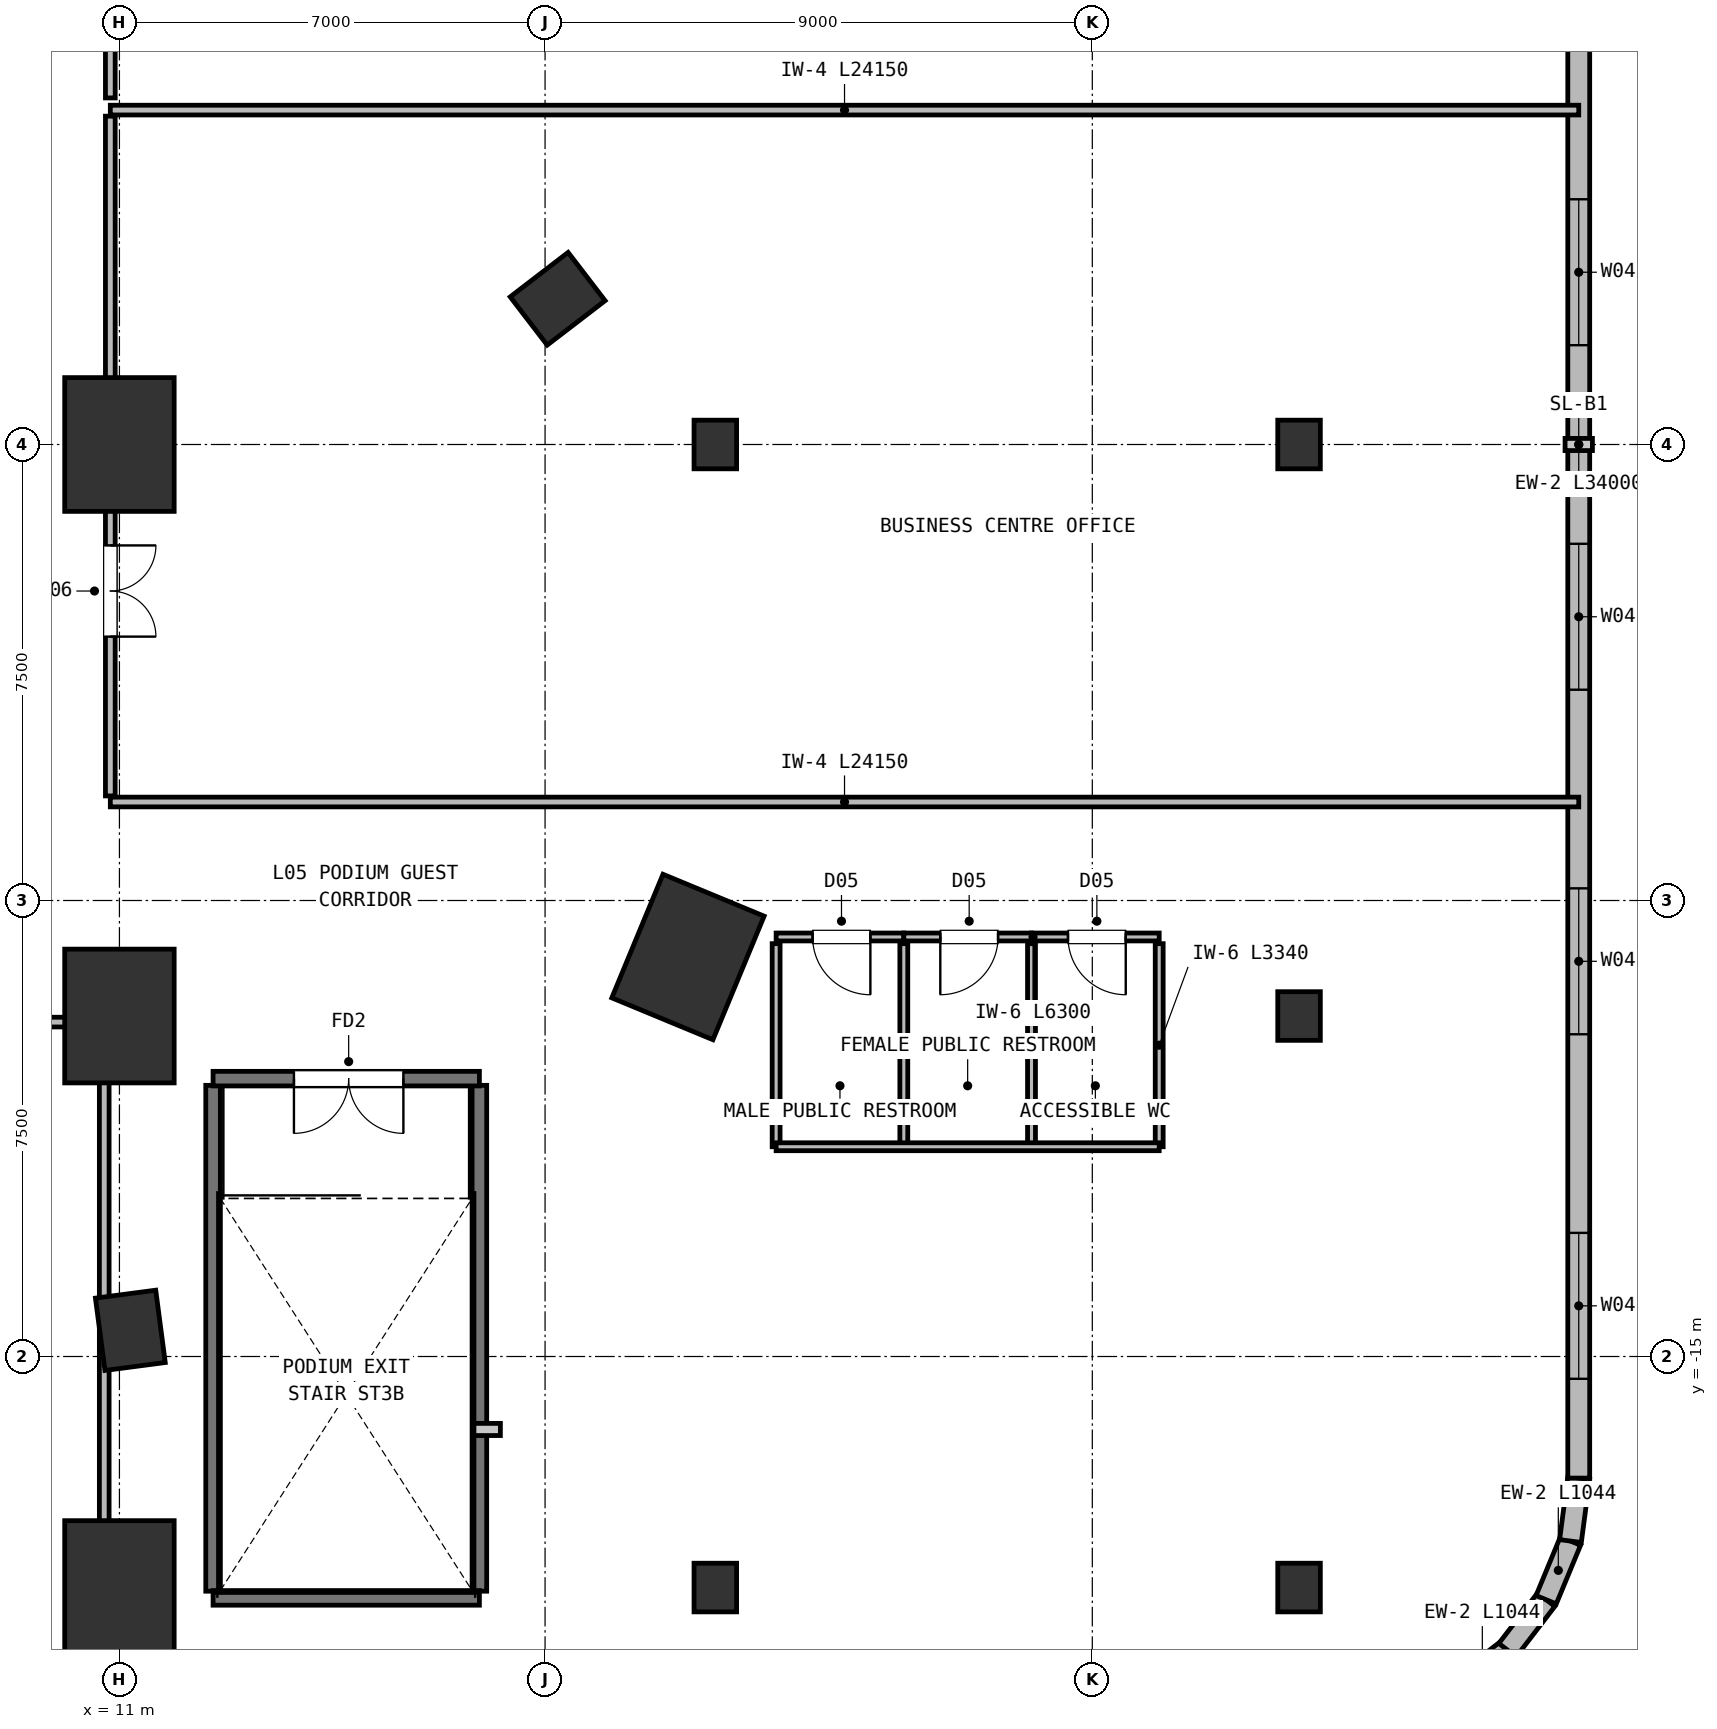
"""IFC4 building model, lengths in metres.
Left out: names, types, materials, properties, quantities, classifications, styles, units other than length and angle.
Written with IfcOpenShell. Run it as: python <this file> out.ifc"""

import sys

from ifc_helpers import new_model, si_unit, direction, frame, frame_2d, origin, origin_2d, place, context, subcontext, project, spatial, rectangle, extrude, element, fill, save


model = new_model("IFC4")
c1 = context("Model", 3, precision=1e-05, world=origin(), true_north=direction((0.0, 1.0)))
c2 = subcontext(c1, "Body", "Model", "MODEL_VIEW")
j1 = project(units=[si_unit("LENGTHUNIT", "METRE"), si_unit("PLANEANGLEUNIT", "RADIAN")], contexts=[c1])
p1 = place(None, origin())
s1 = spatial("IfcSite", under=j1, at=p1, CompositionType="ELEMENT")
p2 = place(p1, origin())
s2 = spatial("IfcBuilding", under=s1, at=p2, CompositionType="ELEMENT")
p3 = place(p2, frame((0.0, 0.0, 26.0)))
s3 = spatial("IfcBuildingStorey", under=s2, at=p3, CompositionType="ELEMENT", Elevation=26.0)
p4 = place(p3, frame((11.179, -14.569, 0.0), z_axis=(0.0, 0.0, 1.0), x_axis=(0.991444861374, 0.13052619222, 0.0)))
e1 = element("IfcColumn", 1, at=p4, inside=s3, PredefinedType="COLUMN", context=c2, shape_type="SweptSolid", body=[
    extrude(rectangle(XDim=1.0, YDim=1.2, at=origin_2d()), origin(), (0.0, 0.0, 1.0), 4.5),
])
p5 = place(p3, frame((20.35, -8.429, 0.0), z_axis=(0.0, 0.0, 1.0), x_axis=(-0.923879532511, 0.382683432365, 0.0)))
e2 = element("IfcColumn", 2, at=p5, inside=s3, PredefinedType="COLUMN", context=c2, shape_type="SweptSolid", body=[
    extrude(rectangle(XDim=1.8, YDim=2.2, at=origin_2d()), origin(), (0.0, 0.0, 1.0), 4.5),
])
p6 = place(p3, frame((18.207, 2.397, 0.0), z_axis=(0.0, 0.0, 1.0), x_axis=(-0.608761429009, 0.793353340291, 0.0)))
e3 = element("IfcColumn", 3, at=p6, inside=s3, PredefinedType="COLUMN", context=c2, shape_type="SweptSolid", body=[
    extrude(rectangle(XDim=1.0, YDim=1.2, at=origin_2d()), origin(), (0.0, 0.0, 1.0), 4.5),
])
for number, where, z_axis, x_axis in (
    (4, (11.0, -18.8, 0.0), (0.0, 0.0, 1.0), (1.0, 0.0, 0.0)),
    (5, (11.0, -9.4, 0.0), (0.0, 0.0, 1.0), (1.0, 0.0, 0.0)),
    (6, (11.0, 0.0, 0.0), (0.0, 0.0, 1.0), (1.0, 0.0, 0.0)),
):
    element("IfcColumn", number, at=place(p3, frame(where, z_axis=z_axis, x_axis=x_axis)), inside=s3, PredefinedType="COLUMN", context=c2, shape_type="SweptSolid", body=[
        extrude(rectangle(XDim=1.8, YDim=2.2, at=origin_2d()), origin(), (0.0, 0.0, 1.0), 4.5),
    ])
for number, where, z_axis, x_axis in (
    (7, (20.8, -18.8, 0.0), (0.0, 0.0, 1.0), (1.0, 0.0, 0.0)),
    (8, (20.8, 0.0, 0.0), (0.0, 0.0, 1.0), (1.0, 0.0, 0.0)),
    (9, (30.4, -18.8, 0.0), (0.0, 0.0, 1.0), (1.0, 0.0, 0.0)),
    (10, (30.4, -9.4, 0.0), (0.0, 0.0, 1.0), (1.0, 0.0, 0.0)),
    (11, (30.4, 0.0, 0.0), (0.0, 0.0, 1.0), (1.0, 0.0, 0.0)),
):
    element("IfcColumn", number, at=place(p3, frame(where, z_axis=z_axis, x_axis=x_axis)), inside=s3, PredefinedType="COLUMN", context=c2, shape_type="SweptSolid", body=[
        extrude(rectangle(XDim=0.7, YDim=0.8, at=origin_2d()), origin(), (0.0, 0.0, 1.0), 4.5),
    ])
for number, where, z_axis, x_axis in (
    (12, (33.828, -19.828, 0.0), (0.0, 0.0, 1.0), (-0.793, -0.609, 0.0)),
    (13, (34.464, -19.0, 0.0), (0.0, 0.0, 1.0), (-0.609, -0.793, 0.0)),
    (14, (34.864, -18.035, 0.0), (0.0, 0.0, 1.0), (-0.383, -0.924, 0.0)),
):
    element("IfcWall", number, at=place(p3, frame(where, z_axis=z_axis, x_axis=x_axis)), inside=s3, PredefinedType="SOLIDWALL", context=c2, shape_type="SweptSolid", body=[
        extrude(rectangle(XDim=1.044, YDim=0.36, at=frame_2d((0.522, 0.0))), origin(), (0.0, 0.0, 1.0), 4.25),
    ])
p7 = place(p3, frame((35.0, -17.0, 0.0), z_axis=(0.0, 0.0, 1.0), x_axis=(-0.130448465198, -0.991455091231, 0.0)))
e15 = element("IfcWall", 15, at=p7, inside=s3, PredefinedType="SOLIDWALL", context=c2, shape_type="SweptSolid", body=[
    extrude(rectangle(XDim=1.044, YDim=0.36, at=frame_2d((0.522, 0.0))), origin(), (0.0, 0.0, 1.0), 4.25),
])
p8 = place(p3, frame((35.0, 17.0, 0.0), z_axis=(0.0, 0.0, 1.0), x_axis=(0.0, -1.0, 0.0)))
e16 = element("IfcWall", 16, at=p8, inside=s3, PredefinedType="SOLIDWALL", context=c2, shape_type="SweptSolid", body=[
    extrude(rectangle(XDim=34.0, YDim=0.36, at=frame_2d((17.0, 0.0))), origin(), (0.0, 0.0, 1.0), 4.25),
])
p9 = place(p8, frame((1.633, 0.0, 0.95)))
e17 = element("IfcOpeningElement", 17, at=p9, cuts=e16, PredefinedType="OPENING", context=c2, shape_type="SweptSolid", body=[
    extrude(rectangle(XDim=2.4, YDim=2.6, at=frame_2d((1.2, 1.3))), frame((0.0, 0.19, 0.0), z_axis=(0.0, -1.0, 0.0), x_axis=(1.0, 0.0, 0.0)), (0.0, 0.0, 1.0), 0.38),
])
p10 = place(p8, frame((7.3, 0.0, 0.95)))
e18 = element("IfcOpeningElement", 18, at=p10, cuts=e16, PredefinedType="OPENING", context=c2, shape_type="SweptSolid", body=[
    extrude(rectangle(XDim=2.4, YDim=2.6, at=frame_2d((1.2, 1.3))), frame((0.0, 0.19, 0.0), z_axis=(0.0, -1.0, 0.0), x_axis=(1.0, 0.0, 0.0)), (0.0, 0.0, 1.0), 0.38),
])
p11 = place(p8, frame((12.967, 0.0, 0.95)))
e19 = element("IfcOpeningElement", 19, at=p11, cuts=e16, PredefinedType="OPENING", context=c2, shape_type="SweptSolid", body=[
    extrude(rectangle(XDim=2.4, YDim=2.6, at=frame_2d((1.2, 1.3))), frame((0.0, 0.19, 0.0), z_axis=(0.0, -1.0, 0.0), x_axis=(1.0, 0.0, 0.0)), (0.0, 0.0, 1.0), 0.38),
])
p12 = place(p8, frame((18.633, 0.0, 0.95)))
e20 = element("IfcOpeningElement", 20, at=p12, cuts=e16, PredefinedType="OPENING", context=c2, shape_type="SweptSolid", body=[
    extrude(rectangle(XDim=2.4, YDim=2.6, at=frame_2d((1.2, 1.3))), frame((0.0, 0.19, 0.0), z_axis=(0.0, -1.0, 0.0), x_axis=(1.0, 0.0, 0.0)), (0.0, 0.0, 1.0), 0.38),
])
p13 = place(p8, frame((24.3, 0.0, 0.95)))
e21 = element("IfcOpeningElement", 21, at=p13, cuts=e16, PredefinedType="OPENING", context=c2, shape_type="SweptSolid", body=[
    extrude(rectangle(XDim=2.4, YDim=2.6, at=frame_2d((1.2, 1.3))), frame((0.0, 0.19, 0.0), z_axis=(0.0, -1.0, 0.0), x_axis=(1.0, 0.0, 0.0)), (0.0, 0.0, 1.0), 0.38),
])
p14 = place(p8, frame((29.967, 0.0, 0.95)))
e22 = element("IfcOpeningElement", 22, at=p14, cuts=e16, PredefinedType="OPENING", context=c2, shape_type="SweptSolid", body=[
    extrude(rectangle(XDim=2.4, YDim=2.6, at=frame_2d((1.2, 1.3))), frame((0.0, 0.19, 0.0), z_axis=(0.0, -1.0, 0.0), x_axis=(1.0, 0.0, 0.0)), (0.0, 0.0, 1.0), 0.38),
])
for number, where, z_axis, x_axis in (
    (23, (12.54, -18.86, 0.0), (0.0, 0.0, 1.0), (0.0, 1.0, 0.0)),
    (24, (16.92, -18.86, 0.0), (0.0, 0.0, 1.0), (0.0, 1.0, 0.0)),
):
    element("IfcWall", number, at=place(p3, frame(where, z_axis=z_axis, x_axis=x_axis)), inside=s3, PredefinedType="SHEAR", context=c2, shape_type="SweptSolid", body=[
        extrude(rectangle(XDim=8.32, YDim=0.24, at=frame_2d((4.16, 0.0))), origin(), (0.0, 0.0, 1.0), 4.25),
    ])
p15 = place(p3, frame((12.54, -18.97, 0.0), z_axis=(0.0, 0.0, 1.0), x_axis=(1.0, 0.0, 0.0)))
e25 = element("IfcWall", 25, at=p15, inside=s3, PredefinedType="SHEAR", context=c2, shape_type="SweptSolid", body=[
    extrude(rectangle(XDim=4.38, YDim=0.24, at=frame_2d((2.19, 0.0))), origin(), (0.0, 0.0, 1.0), 4.25),
])
p16 = place(p3, frame((16.92, -10.43, 0.0), z_axis=(0.0, 0.0, 1.0), x_axis=(-1.0, 0.0, 0.0)))
e26 = element("IfcWall", 26, at=p16, inside=s3, PredefinedType="SHEAR", context=c2, shape_type="SweptSolid", body=[
    extrude(rectangle(XDim=4.38, YDim=0.24, at=frame_2d((2.19, 0.0))), origin(), (0.0, 0.0, 1.0), 4.25),
])
p17 = place(p16, frame((1.25, 0.0, 0.0)))
e27 = element("IfcOpeningElement", 27, at=p17, cuts=e26, PredefinedType="OPENING", context=c2, shape_type="SweptSolid", body=[
    extrude(rectangle(XDim=1.8, YDim=2.2, at=frame_2d((0.9, 1.1))), frame((0.0, 0.13, 0.0), z_axis=(0.0, -1.0, 0.0), x_axis=(1.0, 0.0, 0.0)), (0.0, 0.0, 1.0), 0.26),
])
p18 = place(p3, frame((23.9, -8.1, 0.0), z_axis=(0.0, 0.0, 1.0), x_axis=(-1.0, 0.0, 0.0)))
e28 = element("IfcWall", 28, at=p18, inside=s3, PredefinedType="PARTITIONING", context=c2, shape_type="SweptSolid", body=[
    extrude(rectangle(XDim=2.1, YDim=0.13, at=frame_2d((1.05, 0.0))), origin(), (0.0, 0.0, 1.0), 4.25),
])
p19 = place(p18, frame((0.55, 0.0, 0.0)))
e29 = element("IfcOpeningElement", 29, at=p19, cuts=e28, PredefinedType="OPENING", context=c2, shape_type="SweptSolid", body=[
    extrude(rectangle(XDim=0.95, YDim=2.1, at=frame_2d((0.475, 1.05))), frame((0.0, 0.075, 0.0), z_axis=(0.0, -1.0, 0.0), x_axis=(1.0, 0.0, 0.0)), (0.0, 0.0, 1.0), 0.15),
])
p20 = place(p3, frame((21.8, -11.55, 0.0), z_axis=(0.0, 0.0, 1.0), x_axis=(0.0, 1.0, 0.0)))
e30 = element("IfcWall", 30, at=p20, inside=s3, PredefinedType="PARTITIONING", context=c2, shape_type="SweptSolid", body=[
    extrude(rectangle(XDim=3.34, YDim=0.13, at=frame_2d((1.67, 0.0))), origin(), (0.0, 0.0, 1.0), 4.25),
])
p21 = place(p3, frame((26.0, -8.1, 0.0), z_axis=(0.0, 0.0, 1.0), x_axis=(-1.0, 0.0, 0.0)))
e31 = element("IfcWall", 31, at=p21, inside=s3, PredefinedType="PARTITIONING", context=c2, shape_type="SweptSolid", body=[
    extrude(rectangle(XDim=2.1, YDim=0.13, at=frame_2d((1.05, 0.0))), origin(), (0.0, 0.0, 1.0), 4.25),
])
p22 = place(p21, frame((0.55, 0.0, 0.0)))
e32 = element("IfcOpeningElement", 32, at=p22, cuts=e31, PredefinedType="OPENING", context=c2, shape_type="SweptSolid", body=[
    extrude(rectangle(XDim=0.95, YDim=2.1, at=frame_2d((0.475, 1.05))), frame((0.0, 0.075, 0.0), z_axis=(0.0, -1.0, 0.0), x_axis=(1.0, 0.0, 0.0)), (0.0, 0.0, 1.0), 0.15),
])
p23 = place(p3, frame((23.9, -11.55, 0.0), z_axis=(0.0, 0.0, 1.0), x_axis=(0.0, 1.0, 0.0)))
e33 = element("IfcWall", 33, at=p23, inside=s3, PredefinedType="PARTITIONING", context=c2, shape_type="SweptSolid", body=[
    extrude(rectangle(XDim=3.34, YDim=0.13, at=frame_2d((1.67, 0.0))), origin(), (0.0, 0.0, 1.0), 4.25),
])
p24 = place(p3, frame((28.1, -8.1, 0.0), z_axis=(0.0, 0.0, 1.0), x_axis=(-1.0, 0.0, 0.0)))
e34 = element("IfcWall", 34, at=p24, inside=s3, PredefinedType="PARTITIONING", context=c2, shape_type="SweptSolid", body=[
    extrude(rectangle(XDim=2.1, YDim=0.13, at=frame_2d((1.05, 0.0))), origin(), (0.0, 0.0, 1.0), 4.25),
])
p25 = place(p24, frame((0.55, 0.0, 0.0)))
e35 = element("IfcOpeningElement", 35, at=p25, cuts=e34, PredefinedType="OPENING", context=c2, shape_type="SweptSolid", body=[
    extrude(rectangle(XDim=0.95, YDim=2.1, at=frame_2d((0.475, 1.05))), frame((0.0, 0.075, 0.0), z_axis=(0.0, -1.0, 0.0), x_axis=(1.0, 0.0, 0.0)), (0.0, 0.0, 1.0), 0.15),
])
for number, where, z_axis, x_axis in (
    (36, (26.0, -11.55, 0.0), (0.0, 0.0, 1.0), (0.0, 1.0, 0.0)),
    (37, (28.1, -11.55, 0.0), (0.0, 0.0, 1.0), (0.0, 1.0, 0.0)),
):
    element("IfcWall", number, at=place(p3, frame(where, z_axis=z_axis, x_axis=x_axis)), inside=s3, PredefinedType="PARTITIONING", context=c2, shape_type="SweptSolid", body=[
        extrude(rectangle(XDim=3.34, YDim=0.13, at=frame_2d((1.67, 0.0))), origin(), (0.0, 0.0, 1.0), 4.25),
    ])
p26 = place(p3, frame((21.8, -11.55, 0.0), z_axis=(0.0, 0.0, 1.0), x_axis=(1.0, 0.0, 0.0)))
e38 = element("IfcWall", 38, at=p26, inside=s3, PredefinedType="PARTITIONING", context=c2, shape_type="SweptSolid", body=[
    extrude(rectangle(XDim=6.3, YDim=0.13, at=frame_2d((3.15, 0.0))), origin(), (0.0, 0.0, 1.0), 4.25),
])
p27 = place(p3, frame((35.0, 5.5, 0.0), z_axis=(0.0, 0.0, 1.0), x_axis=(-1.0, 0.0, 0.0)))
e39 = element("IfcWall", 39, at=p27, inside=s3, PredefinedType="PARTITIONING", context=c2, shape_type="SweptSolid", body=[
    extrude(rectangle(XDim=24.15, YDim=0.16, at=frame_2d((12.075, 0.0))), origin(), (0.0, 0.0, 1.0), 3.32),
])
p28 = place(p3, frame((10.85, -5.88, 0.0), z_axis=(0.0, 0.0, 1.0), x_axis=(1.0, 0.0, 0.0)))
e40 = element("IfcWall", 40, at=p28, inside=s3, PredefinedType="PARTITIONING", context=c2, shape_type="SweptSolid", body=[
    extrude(rectangle(XDim=24.15, YDim=0.16, at=frame_2d((12.075, 0.0))), origin(), (0.0, 0.0, 1.0), 4.25),
])
p29 = place(p3, frame((10.85, 5.4, 0.0), z_axis=(0.0, 0.0, 1.0), x_axis=(0.0, -1.0, 0.0)))
e41 = element("IfcWall", 41, at=p29, inside=s3, PredefinedType="PARTITIONING", context=c2, shape_type="SweptSolid", body=[
    extrude(rectangle(XDim=11.18, YDim=0.16, at=frame_2d((5.59, 0.0))), origin(), (0.0, 0.0, 1.0), 3.63),
])
p30 = place(p29, frame((7.06, 0.0, 0.0)))
e42 = element("IfcOpeningElement", 42, at=p30, cuts=e41, PredefinedType="OPENING", context=c2, shape_type="SweptSolid", body=[
    extrude(rectangle(XDim=1.5, YDim=2.2, at=frame_2d((0.75, 1.1))), frame((0.0, 0.09, 0.0), z_axis=(0.0, -1.0, 0.0), x_axis=(1.0, 0.0, 0.0)), (0.0, 0.0, 1.0), 0.18),
])
p31 = place(p3, frame((10.85, 20.9, 0.0), z_axis=(0.0, 0.0, 1.0), x_axis=(0.0, -1.0, 0.0)))
e43 = element("IfcWall", 43, at=p31, inside=s3, PredefinedType="PARTITIONING", context=c2, shape_type="SweptSolid", body=[
    extrude(rectangle(XDim=15.2, YDim=0.16, at=frame_2d((7.6, 0.0))), origin(), (0.0, 0.0, 1.0), 3.62),
])
p32 = place(p31, frame((5.65, 0.0, 0.0)))
e44 = element("IfcOpeningElement", 44, at=p32, cuts=e43, PredefinedType="OPENING", context=c2, shape_type="SweptSolid", body=[
    extrude(rectangle(XDim=1.5, YDim=2.2, at=frame_2d((0.75, 1.1))), frame((0.0, 0.09, 0.0), z_axis=(0.0, -1.0, 0.0), x_axis=(1.0, 0.0, 0.0)), (0.0, 0.0, 1.0), 0.18),
])
p33 = place(p3, frame((10.75, -9.5, 0.0), z_axis=(0.0, 0.0, 1.0), x_axis=(-1.0, 0.0, 0.0)))
e45 = element("IfcWall", 45, at=p33, inside=s3, PredefinedType="PARTITIONING", context=c2, shape_type="SweptSolid", body=[
    extrude(rectangle(XDim=21.5, YDim=0.16, at=frame_2d((10.75, 0.0))), origin(), (0.0, 0.0, 1.0), 3.33),
])
p34 = place(p33, frame((13.8, 0.0, 0.0)))
e46 = element("IfcOpeningElement", 46, at=p34, cuts=e45, PredefinedType="OPENING", context=c2, shape_type="SweptSolid", body=[
    extrude(rectangle(XDim=1.5, YDim=2.2, at=frame_2d((0.75, 1.1))), frame((0.0, 0.09, 0.0), z_axis=(0.0, -1.0, 0.0), x_axis=(1.0, 0.0, 0.0)), (0.0, 0.0, 1.0), 0.18),
])
p35 = place(p3, frame((10.75, -20.9, 0.0), z_axis=(0.0, 0.0, 1.0), x_axis=(0.0, 1.0, 0.0)))
e47 = element("IfcWall", 47, at=p35, inside=s3, PredefinedType="PARTITIONING", context=c2, shape_type="SweptSolid", body=[
    extrude(rectangle(XDim=11.3, YDim=0.16, at=frame_2d((5.65, 0.0))), origin(), (0.0, 0.0, 1.0), 4.25),
])
p36 = place(p11, origin())
e48 = element("IfcWindow", 48, at=p36, inside=s3, PartitioningType="SINGLE_PANEL", PredefinedType="WINDOW", context=c2, shape_type="SweptSolid", body=[
    extrude(rectangle(XDim=2.4, YDim=2.6, at=frame_2d((1.2, 1.3))), frame((0.0, 0.03, 0.0), z_axis=(0.0, -1.0, 0.0), x_axis=(1.0, 0.0, 0.0)), (0.0, 0.0, 1.0), 0.06),
])
fill(e19, e48)
p37 = place(p12, origin())
e49 = element("IfcWindow", 49, at=p37, inside=s3, PartitioningType="SINGLE_PANEL", PredefinedType="WINDOW", context=c2, shape_type="SweptSolid", body=[
    extrude(rectangle(XDim=2.4, YDim=2.6, at=frame_2d((1.2, 1.3))), frame((0.0, 0.03, 0.0), z_axis=(0.0, -1.0, 0.0), x_axis=(1.0, 0.0, 0.0)), (0.0, 0.0, 1.0), 0.06),
])
fill(e20, e49)
p38 = place(p13, origin())
e50 = element("IfcWindow", 50, at=p38, inside=s3, PartitioningType="SINGLE_PANEL", PredefinedType="WINDOW", context=c2, shape_type="SweptSolid", body=[
    extrude(rectangle(XDim=2.4, YDim=2.6, at=frame_2d((1.2, 1.3))), frame((0.0, 0.03, 0.0), z_axis=(0.0, -1.0, 0.0), x_axis=(1.0, 0.0, 0.0)), (0.0, 0.0, 1.0), 0.06),
])
fill(e21, e50)
p39 = place(p14, origin())
e51 = element("IfcWindow", 51, at=p39, inside=s3, PartitioningType="SINGLE_PANEL", PredefinedType="WINDOW", context=c2, shape_type="SweptSolid", body=[
    extrude(rectangle(XDim=2.4, YDim=2.6, at=frame_2d((1.2, 1.3))), frame((0.0, 0.03, 0.0), z_axis=(0.0, -1.0, 0.0), x_axis=(1.0, 0.0, 0.0)), (0.0, 0.0, 1.0), 0.06),
])
fill(e22, e51)
p40 = place(p17, origin())
e52 = element("IfcDoor", 52, at=p40, inside=s3, OperationType="DOUBLE_DOOR_SINGLE_SWING", PredefinedType="DOOR", context=c2, shape_type="SweptSolid", body=[
    extrude(rectangle(XDim=1.8, YDim=2.2, at=frame_2d((0.9, 1.1))), frame((0.0, 0.025, 0.0), z_axis=(0.0, -1.0, 0.0), x_axis=(1.0, 0.0, 0.0)), (0.0, 0.0, 1.0), 0.05),
])
fill(e27, e52)
p41 = place(p19, origin())
e53 = element("IfcDoor", 53, at=p41, inside=s3, OperationType="SINGLE_SWING_LEFT", PredefinedType="DOOR", context=c2, shape_type="SweptSolid", body=[
    extrude(rectangle(XDim=0.95, YDim=2.1, at=frame_2d((0.475, 1.05))), frame((0.0, 0.025, 0.0), z_axis=(0.0, -1.0, 0.0), x_axis=(1.0, 0.0, 0.0)), (0.0, 0.0, 1.0), 0.05),
])
fill(e29, e53)
p42 = place(p22, origin())
e54 = element("IfcDoor", 54, at=p42, inside=s3, OperationType="SINGLE_SWING_RIGHT", PredefinedType="DOOR", context=c2, shape_type="SweptSolid", body=[
    extrude(rectangle(XDim=0.95, YDim=2.1, at=frame_2d((0.475, 1.05))), frame((0.0, 0.025, 0.0), z_axis=(0.0, -1.0, 0.0), x_axis=(1.0, 0.0, 0.0)), (0.0, 0.0, 1.0), 0.05),
])
fill(e32, e54)
p43 = place(p25, origin())
e55 = element("IfcDoor", 55, at=p43, inside=s3, OperationType="SINGLE_SWING_LEFT", PredefinedType="DOOR", context=c2, shape_type="SweptSolid", body=[
    extrude(rectangle(XDim=0.95, YDim=2.1, at=frame_2d((0.475, 1.05))), frame((0.0, 0.025, 0.0), z_axis=(0.0, -1.0, 0.0), x_axis=(1.0, 0.0, 0.0)), (0.0, 0.0, 1.0), 0.05),
])
fill(e35, e55)
p44 = place(p30, origin())
e56 = element("IfcDoor", 56, at=p44, inside=s3, OperationType="DOUBLE_DOOR_SINGLE_SWING", PredefinedType="DOOR", context=c2, shape_type="SweptSolid", body=[
    extrude(rectangle(XDim=1.5, YDim=2.2, at=frame_2d((0.75, 1.1))), frame((0.0, 0.025, 0.0), z_axis=(0.0, -1.0, 0.0), x_axis=(1.0, 0.0, 0.0)), (0.0, 0.0, 1.0), 0.05),
])
fill(e42, e56)
save(model, sys.argv[1])
